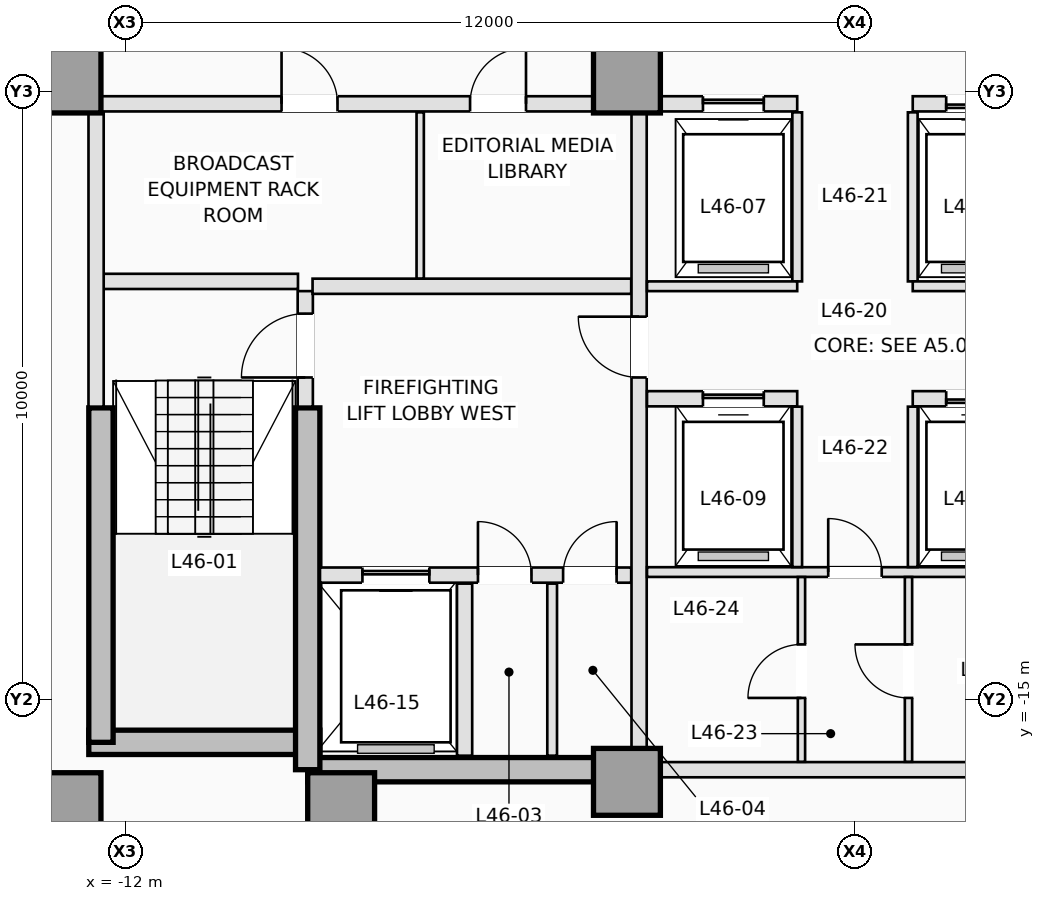
"""IFC4 building model, lengths in metres.
Left out: names, types, materials, properties, quantities, classifications, styles, units other than length and angle.
Written with IfcOpenShell. Run it as: python <this file> out.ifc"""

import sys

from ifc_helpers import new_model, si_unit, direction, frame, frame_2d, origin, origin_2d, place, context, subcontext, project, spatial, rectangle, extrude, element, fill, save


model = new_model("IFC4")
c1 = context("Model", 3, precision=1e-05, world=origin(), true_north=direction((0.0, 1.0)))
c2 = subcontext(c1, "Body", "Model", "MODEL_VIEW")
j1 = project(units=[si_unit("LENGTHUNIT", "METRE"), si_unit("PLANEANGLEUNIT", "RADIAN")], contexts=[c1])
p1 = place(None, origin())
s1 = spatial("IfcSite", under=j1, at=p1, CompositionType="ELEMENT")
p2 = place(p1, origin())
s2 = spatial("IfcBuilding", under=s1, at=p2, CompositionType="ELEMENT")
p3 = place(p2, frame((0.0, 0.0, 168.5)))
s3 = spatial("IfcBuildingStorey", under=s2, at=p3, CompositionType="ELEMENT", Elevation=168.5)
p4 = place(p3, frame((-12.6, -15.7, 0.0), z_axis=(0.0, 0.0, 1.0), x_axis=(1.0, 0.0, 0.0)))
e1 = element("IfcWall", 1, at=p4, inside=s3, PredefinedType="SHEAR", context=c2, shape_type="SweptSolid", body=[
    extrude(rectangle(XDim=3.8, YDim=0.4, at=frame_2d((1.9, 0.0))), origin(), (0.0, 0.0, 1.0), 3.5),
])
p5 = place(p3, frame((-9.0, -16.15, 0.0), z_axis=(0.0, 0.0, 1.0), x_axis=(1.0, 0.0, 0.0)))
e2 = element("IfcWall", 2, at=p5, inside=s3, PredefinedType="SHEAR", context=c2, shape_type="SweptSolid", body=[
    extrude(rectangle(XDim=5.25, YDim=0.4, at=frame_2d((2.625, 0.0))), origin(), (0.0, 0.0, 1.0), 3.5),
])
p6 = place(p3, frame((-12.4, -15.7, 0.0), z_axis=(0.0, 0.0, 1.0), x_axis=(0.0, 1.0, 0.0)))
e3 = element("IfcWall", 3, at=p6, inside=s3, PredefinedType="SHEAR", context=c2, shape_type="SweptSolid", body=[
    extrude(rectangle(XDim=5.5, YDim=0.4, at=frame_2d((2.75, 0.0))), origin(), (0.0, 0.0, 1.0), 3.5),
])
p7 = place(p3, frame((-9.0, -16.15, 0.0), z_axis=(0.0, 0.0, 1.0), x_axis=(0.0, 1.0, 0.0)))
e4 = element("IfcWall", 4, at=p7, inside=s3, PredefinedType="SHEAR", context=c2, shape_type="SweptSolid", body=[
    extrude(rectangle(XDim=5.95, YDim=0.4, at=frame_2d((2.975, 0.0))), origin(), (0.0, 0.0, 1.0), 3.5),
])
for number, where, z_axis, x_axis in (
    (5, (-12.95, -16.75, 0.0), (0.0, 0.0, 1.0), (1.0, 0.0, 0.0)),
    (6, (-8.45, -16.75, 0.0), (0.0, 0.0, 1.0), (1.0, 0.0, 0.0)),
    (7, (-3.75, -16.35, 0.0), (0.0, 0.0, 1.0), (1.0, 0.0, 0.0)),
    (8, (-12.95, -4.8, 0.0), (0.0, 0.0, 1.0), (1.0, 0.0, 0.0)),
    (9, (-3.75, -4.8, 0.0), (0.0, 0.0, 1.0), (1.0, 0.0, 0.0)),
):
    element("IfcColumn", number, at=place(p3, frame(where, z_axis=z_axis, x_axis=x_axis)), inside=s3, PredefinedType="COLUMN", context=c2, shape_type="SweptSolid", body=[
        extrude(rectangle(XDim=1.1, YDim=1.1, at=origin_2d()), origin(), (0.0, 0.0, 1.0), 3.5),
    ])
p8 = place(p3, frame((-9.04, -10.18, 0.0), z_axis=(0.0, 0.0, 1.0), x_axis=(0.0, 1.0, 0.0)))
e10 = element("IfcWall", 10, at=p8, inside=s3, PredefinedType="PARTITIONING", context=c2, shape_type="SweptSolid", body=[
    extrude(rectangle(XDim=1.9, YDim=0.25, at=frame_2d((0.95, 0.0))), origin(), (0.0, 0.0, 1.0), 3.25),
])
p9 = place(p8, frame((0.48, 0.0, 0.0)))
e11 = element("IfcOpeningElement", 11, at=p9, cuts=e10, PredefinedType="OPENING", context=c2, shape_type="SweptSolid", body=[
    extrude(rectangle(XDim=1.05, YDim=2.15, at=frame_2d((0.525, 1.075))), frame((0.0, 0.135, 0.0), z_axis=(0.0, -1.0, 0.0), x_axis=(1.0, 0.0, 0.0)), (0.0, 0.0, 1.0), 0.27),
])
p10 = place(p3, frame((-12.38, -8.12, 0.0), z_axis=(0.0, 0.0, 1.0), x_axis=(1.0, 0.0, 0.0)))
e12 = element("IfcWall", 12, at=p10, inside=s3, PredefinedType="PARTITIONING", context=c2, shape_type="SweptSolid", body=[
    extrude(rectangle(XDim=3.22, YDim=0.25, at=frame_2d((1.61, 0.0))), origin(), (0.0, 0.0, 1.0), 3.25),
])
p11 = place(p3, frame((-12.48, -10.18, 0.0), z_axis=(0.0, 0.0, 1.0), x_axis=(0.0, 1.0, 0.0)))
e13 = element("IfcWall", 13, at=p11, inside=s3, PredefinedType="PARTITIONING", context=c2, shape_type="SweptSolid", body=[
    extrude(rectangle(XDim=4.828, YDim=0.25, at=frame_2d((2.414, 0.0))), origin(), (0.0, 0.0, 1.0), 3.25),
])
p12 = place(p3, frame((-8.798, -12.95, 0.0), z_axis=(0.0, 0.0, 1.0), x_axis=(1.0, 0.0, 0.0)))
e14 = element("IfcWall", 14, at=p12, inside=s3, PredefinedType="PARTITIONING", context=c2, shape_type="SweptSolid", body=[
    extrude(rectangle(XDim=5.118, YDim=0.25, at=frame_2d((2.559, 0.0))), origin(), (0.0, 0.0, 1.0), 3.25),
])
p13 = place(p12, frame((0.698, 0.0, 0.0)))
e15 = element("IfcOpeningElement", 15, at=p13, cuts=e14, PredefinedType="OPENING", context=c2, shape_type="SweptSolid", body=[
    extrude(rectangle(XDim=1.1, YDim=2.15, at=frame_2d((0.55, 1.075))), frame((0.0, 0.135, 0.0), z_axis=(0.0, -1.0, 0.0), x_axis=(1.0, 0.0, 0.0)), (0.0, 0.0, 1.0), 0.27),
])
p14 = place(p12, frame((2.598, 0.0, 0.0)))
e16 = element("IfcOpeningElement", 16, at=p14, cuts=e14, PredefinedType="OPENING", context=c2, shape_type="SweptSolid", body=[
    extrude(rectangle(XDim=0.88, YDim=2.1, at=frame_2d((0.44, 1.05))), frame((0.0, 0.135, 0.0), z_axis=(0.0, -1.0, 0.0), x_axis=(1.0, 0.0, 0.0)), (0.0, 0.0, 1.0), 0.27),
])
p15 = place(p12, frame((3.998, 0.0, 0.0)))
e17 = element("IfcOpeningElement", 17, at=p15, cuts=e14, PredefinedType="OPENING", context=c2, shape_type="SweptSolid", body=[
    extrude(rectangle(XDim=0.88, YDim=2.1, at=frame_2d((0.44, 1.05))), frame((0.0, 0.135, 0.0), z_axis=(0.0, -1.0, 0.0), x_axis=(1.0, 0.0, 0.0)), (0.0, 0.0, 1.0), 0.27),
])
p16 = place(p3, frame((-6.42, -15.92, 0.0), z_axis=(0.0, 0.0, 1.0), x_axis=(0.0, 1.0, 0.0)))
e18 = element("IfcWall", 18, at=p16, inside=s3, PredefinedType="PARTITIONING", context=c2, shape_type="SweptSolid", body=[
    extrude(rectangle(XDim=2.83, YDim=0.25, at=frame_2d((1.415, 0.0))), origin(), (0.0, 0.0, 1.0), 3.25),
])
p17 = place(p3, frame((-4.98, -15.92, 0.0), z_axis=(0.0, 0.0, 1.0), x_axis=(0.0, 1.0, 0.0)))
e19 = element("IfcWall", 19, at=p17, inside=s3, PredefinedType="PARTITIONING", context=c2, shape_type="SweptSolid", body=[
    extrude(rectangle(XDim=2.83, YDim=0.16, at=frame_2d((1.415, 0.0))), origin(), (0.0, 0.0, 1.0), 3.25),
])
p18 = place(p3, frame((-8.92, -8.2, 0.0), z_axis=(0.0, 0.0, 1.0), x_axis=(1.0, 0.0, 0.0)))
e20 = element("IfcWall", 20, at=p18, inside=s3, PredefinedType="PARTITIONING", context=c2, shape_type="SweptSolid", body=[
    extrude(rectangle(XDim=5.24, YDim=0.25, at=frame_2d((2.62, 0.0))), origin(), (0.0, 0.0, 1.0), 3.25),
])
p19 = place(p3, frame((-3.55, -15.798, 0.0), z_axis=(0.0, 0.0, 1.0), x_axis=(0.0, 1.0, 0.0)))
e21 = element("IfcWall", 21, at=p19, inside=s3, PredefinedType="PARTITIONING", context=c2, shape_type="SweptSolid", body=[
    extrude(rectangle(XDim=10.446, YDim=0.25, at=frame_2d((5.223, 0.0))), origin(), (0.0, 0.0, 1.0), 3.25),
])
p20 = place(p19, frame((6.098, 0.0, 0.0)))
e22 = element("IfcOpeningElement", 22, at=p20, cuts=e21, PredefinedType="OPENING", context=c2, shape_type="SweptSolid", body=[
    extrude(rectangle(XDim=1.0, YDim=2.15, at=frame_2d((0.5, 1.075))), frame((0.0, 0.135, 0.0), z_axis=(0.0, -1.0, 0.0), x_axis=(1.0, 0.0, 0.0)), (0.0, 0.0, 1.0), 0.27),
])
p21 = place(p3, frame((-12.398, -5.2, 0.0), z_axis=(0.0, 0.0, 1.0), x_axis=(1.0, 0.0, 0.0)))
e23 = element("IfcWall", 23, at=p21, inside=s3, PredefinedType="PARTITIONING", context=c2, shape_type="SweptSolid", body=[
    extrude(rectangle(XDim=8.096, YDim=0.25, at=frame_2d((4.048, 0.0))), origin(), (0.0, 0.0, 1.0), 3.25),
])
p22 = place(p21, frame((2.968, 0.0, 0.0)))
e24 = element("IfcOpeningElement", 24, at=p22, cuts=e23, PredefinedType="OPENING", context=c2, shape_type="SweptSolid", body=[
    extrude(rectangle(XDim=0.92, YDim=2.12, at=frame_2d((0.46, 1.06))), frame((0.0, 0.135, 0.0), z_axis=(0.0, -1.0, 0.0), x_axis=(1.0, 0.0, 0.0)), (0.0, 0.0, 1.0), 0.27),
])
p23 = place(p21, frame((6.068, 0.0, 0.0)))
e25 = element("IfcOpeningElement", 25, at=p23, cuts=e23, PredefinedType="OPENING", context=c2, shape_type="SweptSolid", body=[
    extrude(rectangle(XDim=0.92, YDim=2.12, at=frame_2d((0.46, 1.06))), frame((0.0, 0.135, 0.0), z_axis=(0.0, -1.0, 0.0), x_axis=(1.0, 0.0, 0.0)), (0.0, 0.0, 1.0), 0.27),
])
p24 = place(p3, frame((-3.198, -5.2, 0.0), z_axis=(0.0, 0.0, 1.0), x_axis=(1.0, 0.0, 0.0)))
e26 = element("IfcWall", 26, at=p24, inside=s3, PredefinedType="PARTITIONING", context=c2, shape_type="SweptSolid", body=[
    extrude(rectangle(XDim=2.248, YDim=0.25, at=frame_2d((1.124, 0.0))), origin(), (0.0, 0.0, 1.0), 3.25),
])
p25 = place(p24, frame((0.698, 0.0, 0.0)))
e27 = element("IfcOpeningElement", 27, at=p25, cuts=e26, PredefinedType="OPENING", context=c2, shape_type="SweptSolid", body=[
    extrude(rectangle(XDim=1.0, YDim=2.15, at=frame_2d((0.5, 1.075))), frame((0.0, 0.135, 0.0), z_axis=(0.0, -1.0, 0.0), x_axis=(1.0, 0.0, 0.0)), (0.0, 0.0, 1.0), 0.27),
])
p26 = place(p3, frame((0.95, -5.2, 0.0), z_axis=(0.0, 0.0, 1.0), x_axis=(1.0, 0.0, 0.0)))
e28 = element("IfcWall", 28, at=p26, inside=s3, PredefinedType="PARTITIONING", context=c2, shape_type="SweptSolid", body=[
    extrude(rectangle(XDim=2.248, YDim=0.25, at=frame_2d((1.124, 0.0))), origin(), (0.0, 0.0, 1.0), 3.25),
])
p27 = place(p26, frame((0.55, 0.0, 0.0)))
e29 = element("IfcOpeningElement", 29, at=p27, cuts=e28, PredefinedType="OPENING", context=c2, shape_type="SweptSolid", body=[
    extrude(rectangle(XDim=1.0, YDim=2.15, at=frame_2d((0.5, 1.075))), frame((0.0, 0.135, 0.0), z_axis=(0.0, -1.0, 0.0), x_axis=(1.0, 0.0, 0.0)), (0.0, 0.0, 1.0), 0.27),
])
p28 = place(p3, frame((-7.15, -8.073, 0.0), z_axis=(0.0, 0.0, 1.0), x_axis=(0.0, 1.0, 0.0)))
e30 = element("IfcWall", 30, at=p28, inside=s3, PredefinedType="PARTITIONING", context=c2, shape_type="SweptSolid", body=[
    extrude(rectangle(XDim=2.733, YDim=0.12, at=frame_2d((1.366, 0.0))), origin(), (0.0, 0.0, 1.0), 3.25),
])
p29 = place(p3, frame((-3.198, -16.15, 0.0), z_axis=(0.0, 0.0, 1.0), x_axis=(1.0, 0.0, 0.0)))
e31 = element("IfcWall", 31, at=p29, inside=s3, PredefinedType="PARTITIONING", context=c2, shape_type="SweptSolid", body=[
    extrude(rectangle(XDim=6.396, YDim=0.25, at=frame_2d((3.198, 0.0))), origin(), (0.0, 0.0, 1.0), 2.45),
])
for number, where, z_axis, x_axis in (
    (32, (-0.95, -8.12, 0.0), (0.0, 0.0, 1.0), (0.0, 1.0, 0.0)),
    (33, (0.95, -8.12, 0.0), (0.0, 0.0, 1.0), (0.0, 1.0, 0.0)),
):
    element("IfcWall", number, at=place(p3, frame(where, z_axis=z_axis, x_axis=x_axis)), inside=s3, PredefinedType="PARTITIONING", context=c2, shape_type="SweptSolid", body=[
        extrude(rectangle(XDim=2.78, YDim=0.16, at=frame_2d((1.39, 0.0))), origin(), (0.0, 0.0, 1.0), 3.25),
    ])
for number, where, z_axis, x_axis in (
    (34, (-3.42, -8.2, 0.0), (0.0, 0.0, 1.0), (1.0, 0.0, 0.0)),
    (35, (0.95, -8.2, 0.0), (0.0, 0.0, 1.0), (1.0, 0.0, 0.0)),
):
    element("IfcWall", number, at=place(p3, frame(where, z_axis=z_axis, x_axis=x_axis)), inside=s3, PredefinedType="PARTITIONING", context=c2, shape_type="SweptSolid", body=[
        extrude(rectangle(XDim=2.47, YDim=0.16, at=frame_2d((1.235, 0.0))), origin(), (0.0, 0.0, 1.0), 3.25),
    ])
p30 = place(p3, frame((-3.42, -10.05, 0.0), z_axis=(0.0, 0.0, 1.0), x_axis=(1.0, 0.0, 0.0)))
e36 = element("IfcWall", 36, at=p30, inside=s3, PredefinedType="PARTITIONING", context=c2, shape_type="SweptSolid", body=[
    extrude(rectangle(XDim=2.47, YDim=0.25, at=frame_2d((1.235, 0.0))), origin(), (0.0, 0.0, 1.0), 3.25),
])
p31 = place(p30, frame((0.92, 0.0, 0.0)))
e37 = element("IfcOpeningElement", 37, at=p31, cuts=e36, PredefinedType="OPENING", context=c2, shape_type="SweptSolid", body=[
    extrude(rectangle(XDim=1.0, YDim=2.15, at=frame_2d((0.5, 1.075))), frame((0.0, 0.135, 0.0), z_axis=(0.0, -1.0, 0.0), x_axis=(1.0, 0.0, 0.0)), (0.0, 0.0, 1.0), 0.27),
])
p32 = place(p3, frame((0.95, -10.05, 0.0), z_axis=(0.0, 0.0, 1.0), x_axis=(1.0, 0.0, 0.0)))
e38 = element("IfcWall", 38, at=p32, inside=s3, PredefinedType="PARTITIONING", context=c2, shape_type="SweptSolid", body=[
    extrude(rectangle(XDim=2.47, YDim=0.25, at=frame_2d((1.235, 0.0))), origin(), (0.0, 0.0, 1.0), 3.25),
])
p33 = place(p32, frame((0.55, 0.0, 0.0)))
e39 = element("IfcOpeningElement", 39, at=p33, cuts=e38, PredefinedType="OPENING", context=c2, shape_type="SweptSolid", body=[
    extrude(rectangle(XDim=1.0, YDim=2.15, at=frame_2d((0.5, 1.075))), frame((0.0, 0.135, 0.0), z_axis=(0.0, -1.0, 0.0), x_axis=(1.0, 0.0, 0.0)), (0.0, 0.0, 1.0), 0.27),
])
p34 = place(p3, frame((-3.42, -12.9, 0.0), z_axis=(0.0, 0.0, 1.0), x_axis=(1.0, 0.0, 0.0)))
e40 = element("IfcWall", 40, at=p34, inside=s3, PredefinedType="PARTITIONING", context=c2, shape_type="SweptSolid", body=[
    extrude(rectangle(XDim=6.84, YDim=0.16, at=frame_2d((3.42, 0.0))), origin(), (0.0, 0.0, 1.0), 3.25),
])
p35 = place(p34, frame((2.98, 0.0, 0.0)))
e41 = element("IfcOpeningElement", 41, at=p35, cuts=e40, PredefinedType="OPENING", context=c2, shape_type="SweptSolid", body=[
    extrude(rectangle(XDim=0.88, YDim=2.12, at=frame_2d((0.44, 1.06))), frame((0.0, 0.09, 0.0), z_axis=(0.0, -1.0, 0.0), x_axis=(1.0, 0.0, 0.0)), (0.0, 0.0, 1.0), 0.18),
])
for number, where, z_axis, x_axis in (
    (42, (-0.95, -12.818, 0.0), (0.0, 0.0, 1.0), (0.0, 1.0, 0.0)),
    (43, (0.95, -12.818, 0.0), (0.0, 0.0, 1.0), (0.0, 1.0, 0.0)),
):
    element("IfcWall", number, at=place(p3, frame(where, z_axis=z_axis, x_axis=x_axis)), inside=s3, PredefinedType="PARTITIONING", context=c2, shape_type="SweptSolid", body=[
        extrude(rectangle(XDim=2.638, YDim=0.16, at=frame_2d((1.319, 0.0))), origin(), (0.0, 0.0, 1.0), 3.25),
    ])
p36 = place(p3, frame((-0.88, -16.02, 0.0), z_axis=(0.0, 0.0, 1.0), x_axis=(0.0, 1.0, 0.0)))
e44 = element("IfcWall", 44, at=p36, inside=s3, PredefinedType="PARTITIONING", context=c2, shape_type="SweptSolid", body=[
    extrude(rectangle(XDim=3.038, YDim=0.12, at=frame_2d((1.519, 0.0))), origin(), (0.0, 0.0, 1.0), 3.25),
])
p37 = place(p36, frame((1.05, 0.0, 0.0)))
e45 = element("IfcOpeningElement", 45, at=p37, cuts=e44, PredefinedType="OPENING", context=c2, shape_type="SweptSolid", body=[
    extrude(rectangle(XDim=0.88, YDim=2.12, at=frame_2d((0.44, 1.06))), frame((0.0, 0.07, 0.0), z_axis=(0.0, -1.0, 0.0), x_axis=(1.0, 0.0, 0.0)), (0.0, 0.0, 1.0), 0.14),
])
p38 = place(p3, frame((0.88, -16.02, 0.0), z_axis=(0.0, 0.0, 1.0), x_axis=(0.0, 1.0, 0.0)))
e46 = element("IfcWall", 46, at=p38, inside=s3, PredefinedType="PARTITIONING", context=c2, shape_type="SweptSolid", body=[
    extrude(rectangle(XDim=3.038, YDim=0.12, at=frame_2d((1.519, 0.0))), origin(), (0.0, 0.0, 1.0), 3.25),
])
p39 = place(p38, frame((1.05, 0.0, 0.0)))
e47 = element("IfcOpeningElement", 47, at=p39, cuts=e46, PredefinedType="OPENING", context=c2, shape_type="SweptSolid", body=[
    extrude(rectangle(XDim=0.88, YDim=2.12, at=frame_2d((0.44, 1.06))), frame((0.0, 0.07, 0.0), z_axis=(0.0, -1.0, 0.0), x_axis=(1.0, 0.0, 0.0)), (0.0, 0.0, 1.0), 0.14),
])
p40 = place(p25, origin())
e48 = element("IfcDoor", 48, at=p40, inside=s3, OperationType="SLIDING_TO_LEFT", PredefinedType="DOOR", context=c2, shape_type="SweptSolid", body=[
    extrude(rectangle(XDim=1.0, YDim=2.15, at=frame_2d((0.5, 1.075))), frame((0.0, 0.025, 0.0), z_axis=(0.0, -1.0, 0.0), x_axis=(1.0, 0.0, 0.0)), (0.0, 0.0, 1.0), 0.05),
])
fill(e27, e48)
p41 = place(p27, origin())
e49 = element("IfcDoor", 49, at=p41, inside=s3, OperationType="SLIDING_TO_RIGHT", PredefinedType="DOOR", context=c2, shape_type="SweptSolid", body=[
    extrude(rectangle(XDim=1.0, YDim=2.15, at=frame_2d((0.5, 1.075))), frame((0.0, 0.025, 0.0), z_axis=(0.0, -1.0, 0.0), x_axis=(1.0, 0.0, 0.0)), (0.0, 0.0, 1.0), 0.05),
])
fill(e29, e49)
p42 = place(p13, origin())
e50 = element("IfcDoor", 50, at=p42, inside=s3, OperationType="SLIDING_TO_LEFT", PredefinedType="DOOR", context=c2, shape_type="SweptSolid", body=[
    extrude(rectangle(XDim=1.1, YDim=2.15, at=frame_2d((0.55, 1.075))), frame((0.0, 0.025, 0.0), z_axis=(0.0, -1.0, 0.0), x_axis=(1.0, 0.0, 0.0)), (0.0, 0.0, 1.0), 0.05),
])
fill(e15, e50)
p43 = place(p31, origin())
e51 = element("IfcDoor", 51, at=p43, inside=s3, OperationType="SLIDING_TO_LEFT", PredefinedType="DOOR", context=c2, shape_type="SweptSolid", body=[
    extrude(rectangle(XDim=1.0, YDim=2.15, at=frame_2d((0.5, 1.075))), frame((0.0, 0.025, 0.0), z_axis=(0.0, -1.0, 0.0), x_axis=(1.0, 0.0, 0.0)), (0.0, 0.0, 1.0), 0.05),
])
fill(e37, e51)
p44 = place(p33, origin())
e52 = element("IfcDoor", 52, at=p44, inside=s3, OperationType="SLIDING_TO_RIGHT", PredefinedType="DOOR", context=c2, shape_type="SweptSolid", body=[
    extrude(rectangle(XDim=1.0, YDim=2.15, at=frame_2d((0.5, 1.075))), frame((0.0, 0.025, 0.0), z_axis=(0.0, -1.0, 0.0), x_axis=(1.0, 0.0, 0.0)), (0.0, 0.0, 1.0), 0.05),
])
fill(e39, e52)
p45 = place(p9, origin())
e53 = element("IfcDoor", 53, at=p45, inside=s3, OperationType="SINGLE_SWING_LEFT", PredefinedType="DOOR", context=c2, shape_type="SweptSolid", body=[
    extrude(rectangle(XDim=1.05, YDim=2.15, at=frame_2d((0.525, 1.075))), frame((0.0, 0.025, 0.0), z_axis=(0.0, -1.0, 0.0), x_axis=(1.0, 0.0, 0.0)), (0.0, 0.0, 1.0), 0.05),
])
fill(e11, e53)
p46 = place(p14, origin())
e54 = element("IfcDoor", 54, at=p46, inside=s3, OperationType="SINGLE_SWING_LEFT", PredefinedType="TRAPDOOR", context=c2, shape_type="SweptSolid", body=[
    extrude(rectangle(XDim=0.88, YDim=2.1, at=frame_2d((0.44, 1.05))), frame((0.0, 0.025, 0.0), z_axis=(0.0, -1.0, 0.0), x_axis=(1.0, 0.0, 0.0)), (0.0, 0.0, 1.0), 0.05),
])
fill(e16, e54)
p47 = place(p15, origin())
e55 = element("IfcDoor", 55, at=p47, inside=s3, OperationType="SINGLE_SWING_RIGHT", PredefinedType="TRAPDOOR", context=c2, shape_type="SweptSolid", body=[
    extrude(rectangle(XDim=0.88, YDim=2.1, at=frame_2d((0.44, 1.05))), frame((0.0, 0.025, 0.0), z_axis=(0.0, -1.0, 0.0), x_axis=(1.0, 0.0, 0.0)), (0.0, 0.0, 1.0), 0.05),
])
fill(e17, e55)
p48 = place(p20, origin())
e56 = element("IfcDoor", 56, at=p48, inside=s3, OperationType="SINGLE_SWING_RIGHT", PredefinedType="DOOR", context=c2, shape_type="SweptSolid", body=[
    extrude(rectangle(XDim=1.0, YDim=2.15, at=frame_2d((0.5, 1.075))), frame((0.0, 0.025, 0.0), z_axis=(0.0, -1.0, 0.0), x_axis=(1.0, 0.0, 0.0)), (0.0, 0.0, 1.0), 0.05),
])
fill(e22, e56)
p49 = place(p22, origin())
e57 = element("IfcDoor", 57, at=p49, inside=s3, OperationType="SINGLE_SWING_LEFT", PredefinedType="DOOR", context=c2, shape_type="SweptSolid", body=[
    extrude(rectangle(XDim=0.92, YDim=2.12, at=frame_2d((0.46, 1.06))), frame((0.0, 0.025, 0.0), z_axis=(0.0, -1.0, 0.0), x_axis=(1.0, 0.0, 0.0)), (0.0, 0.0, 1.0), 0.05),
])
fill(e24, e57)
p50 = place(p23, origin())
e58 = element("IfcDoor", 58, at=p50, inside=s3, OperationType="SINGLE_SWING_RIGHT", PredefinedType="DOOR", context=c2, shape_type="SweptSolid", body=[
    extrude(rectangle(XDim=0.92, YDim=2.12, at=frame_2d((0.46, 1.06))), frame((0.0, 0.025, 0.0), z_axis=(0.0, -1.0, 0.0), x_axis=(1.0, 0.0, 0.0)), (0.0, 0.0, 1.0), 0.05),
])
fill(e25, e58)
p51 = place(p35, origin())
e59 = element("IfcDoor", 59, at=p51, inside=s3, OperationType="SINGLE_SWING_LEFT", PredefinedType="DOOR", context=c2, shape_type="SweptSolid", body=[
    extrude(rectangle(XDim=0.88, YDim=2.12, at=frame_2d((0.44, 1.06))), frame((0.0, 0.025, 0.0), z_axis=(0.0, -1.0, 0.0), x_axis=(1.0, 0.0, 0.0)), (0.0, 0.0, 1.0), 0.05),
])
fill(e41, e59)
p52 = place(p37, origin())
e60 = element("IfcDoor", 60, at=p52, inside=s3, OperationType="SINGLE_SWING_LEFT", PredefinedType="DOOR", context=c2, shape_type="SweptSolid", body=[
    extrude(rectangle(XDim=0.88, YDim=2.12, at=frame_2d((0.44, 1.06))), frame((0.0, 0.025, 0.0), z_axis=(0.0, -1.0, 0.0), x_axis=(1.0, 0.0, 0.0)), (0.0, 0.0, 1.0), 0.05),
])
fill(e45, e60)
p53 = place(p39, origin())
e61 = element("IfcDoor", 61, at=p53, inside=s3, OperationType="SINGLE_SWING_RIGHT", PredefinedType="DOOR", context=c2, shape_type="SweptSolid", body=[
    extrude(rectangle(XDim=0.88, YDim=2.12, at=frame_2d((0.44, 1.06))), frame((0.0, 0.025, 0.0), z_axis=(0.0, -1.0, 0.0), x_axis=(1.0, 0.0, 0.0)), (0.0, 0.0, 1.0), 0.05),
])
fill(e47, e61)
save(model, sys.argv[1])
